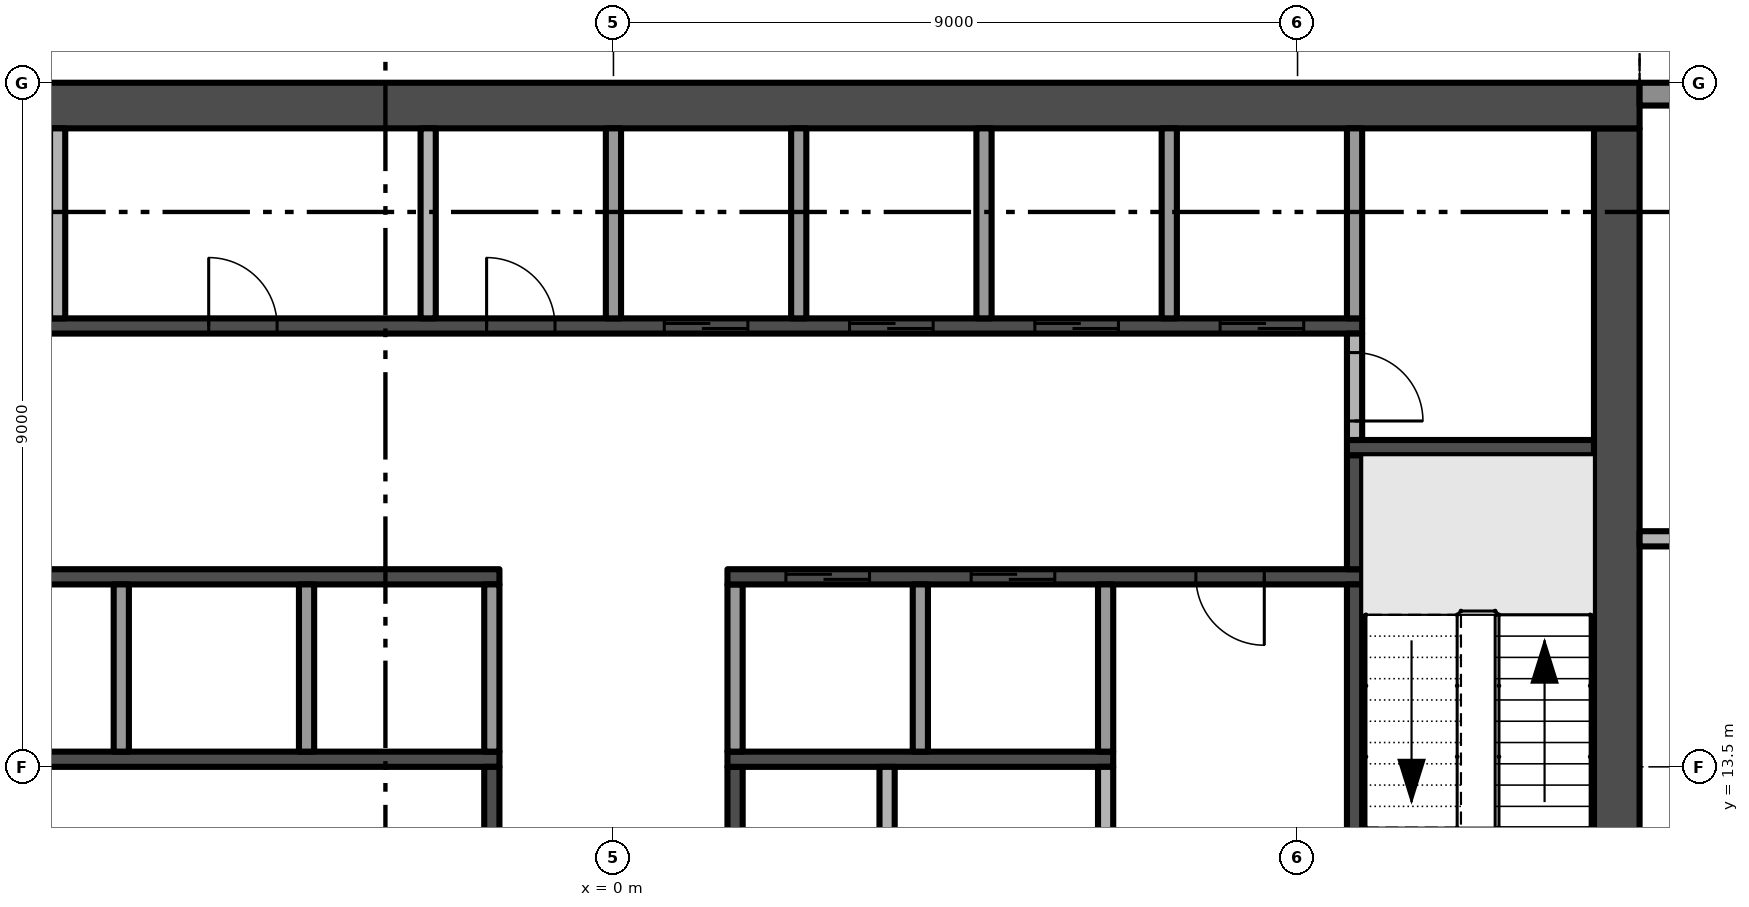
"""IFC4 building model, lengths in metres.
Left out: names, types, materials, properties, quantities, classifications, styles, units other than length and angle.
Written with IfcOpenShell. Run it as: python <this file> out.ifc"""

import sys

from ifc_helpers import new_model, si_unit, direction, frame, frame_2d, origin, place, context, subcontext, project, spatial, rectangle, extrude, element, fill, save


model = new_model("IFC4")
c1 = context("Model", 3, precision=1e-05, world=origin(), true_north=direction((0.0, 1.0)))
c2 = subcontext(c1, "Body", "Model", "MODEL_VIEW")
j1 = project(units=[si_unit("LENGTHUNIT", "METRE"), si_unit("PLANEANGLEUNIT", "RADIAN")], contexts=[c1])
p1 = place(None, origin())
s1 = spatial("IfcSite", under=j1, at=p1, CompositionType="ELEMENT")
p2 = place(p1, origin())
s2 = spatial("IfcBuilding", under=s1, at=p2, CompositionType="ELEMENT")
p3 = place(p2, frame((0.0, 0.0, 269.2)))
s3 = spatial("IfcBuildingStorey", under=s2, at=p3, CompositionType="ELEMENT", Elevation=269.2)
p4 = place(p3, frame((13.2, 5.1, -0.3), z_axis=(0.0, 0.0, 1.0), x_axis=(0.0, 1.0, 0.0)))
e1 = element("IfcWall", 1, at=p4, inside=s3, PredefinedType="SHEAR", context=c2, shape_type="SweptSolid", body=[
    extrude(rectangle(XDim=16.8, YDim=0.6, at=frame_2d((8.4, 0.0))), origin(), (0.0, 0.0, 1.0), 3.8),
])
p5 = place(p4, frame((6.3, 0.0, 0.3)))
e2 = element("IfcOpeningElement", 2, at=p5, cuts=e1, PredefinedType="OPENING", context=c2, shape_type="SweptSolid", body=[
    extrude(rectangle(XDim=1.2, YDim=2.2, at=frame_2d((0.6, 1.1))), frame((0.0, 0.31, 0.0), z_axis=(0.0, -1.0, 0.0), x_axis=(1.0, 0.0, 0.0)), (0.0, 0.0, 1.0), 0.62),
])
p6 = place(p3, frame((13.5, 22.2, -0.3), z_axis=(0.0, 0.0, 1.0), x_axis=(-1.0, 0.0, 0.0)))
e3 = element("IfcWall", 3, at=p6, inside=s3, PredefinedType="SHEAR", context=c2, shape_type="SweptSolid", body=[
    extrude(rectangle(XDim=27.0, YDim=0.6, at=frame_2d((13.5, 0.0))), origin(), (0.0, 0.0, 1.0), 3.8),
])
p7 = place(p3, frame((13.5, 22.35, 0.0), z_axis=(0.0, 0.0, 1.0), x_axis=(1.0, 0.0, 0.0)))
e4 = element("IfcWall", 4, at=p7, inside=s3, PredefinedType="SOLIDWALL", context=c2, shape_type="SweptSolid", body=[
    extrude(rectangle(XDim=4.05, YDim=0.3, at=frame_2d((2.025, 0.0))), origin(), (0.0, 0.0, 1.0), 3.5),
])
p8 = place(p7, frame((0.55, 0.0, 0.0)))
e5 = element("IfcOpeningElement", 5, at=p8, cuts=e4, PredefinedType="OPENING", context=c2, shape_type="SweptSolid", body=[
    extrude(rectangle(XDim=3.2, YDim=2.4, at=frame_2d((1.6, 1.2))), frame((0.0, 0.16, 0.0), z_axis=(0.0, -1.0, 0.0), x_axis=(1.0, 0.0, 0.0)), (0.0, 0.0, 1.0), 0.32),
])
p9 = place(p3, frame((-9.85, 13.6, 0.0), z_axis=(0.0, 0.0, 1.0), x_axis=(1.0, 0.0, 0.0)))
e6 = element("IfcWall", 6, at=p9, inside=s3, PredefinedType="SHEAR", context=c2, shape_type="SweptSolid", body=[
    extrude(rectangle(XDim=8.35, YDim=0.2, at=frame_2d((4.175, 0.0))), origin(), (0.0, 0.0, 1.0), 3.5),
])
p10 = place(p3, frame((-1.5, 16.0, 0.0), z_axis=(0.0, 0.0, 1.0), x_axis=(-1.0, 0.0, 0.0)))
e7 = element("IfcWall", 7, at=p10, inside=s3, PredefinedType="SHEAR", context=c2, shape_type="SweptSolid", body=[
    extrude(rectangle(XDim=8.35, YDim=0.2, at=frame_2d((4.175, 0.0))), origin(), (0.0, 0.0, 1.0), 3.5),
])
p11 = place(p10, frame((6.162, 0.0, 0.0)))
e8 = element("IfcOpeningElement", 8, at=p11, cuts=e7, PredefinedType="OPENING", context=c2, shape_type="SweptSolid", body=[
    extrude(rectangle(XDim=0.9, YDim=2.1, at=frame_2d((0.45, 1.05))), frame((0.0, 0.11, 0.0), z_axis=(0.0, -1.0, 0.0), x_axis=(1.0, 0.0, 0.0)), (0.0, 0.0, 1.0), 0.22),
])
p12 = place(p3, frame((-9.85, 19.3, 0.0), z_axis=(0.0, 0.0, 1.0), x_axis=(1.0, 0.0, 0.0)))
e9 = element("IfcWall", 9, at=p12, inside=s3, PredefinedType="SHEAR", context=c2, shape_type="SweptSolid", body=[
    extrude(rectangle(XDim=19.7, YDim=0.2, at=frame_2d((9.85, 0.0))), origin(), (0.0, 0.0, 1.0), 3.5),
])
p13 = place(p12, frame((10.519, 0.0, 0.0)))
e10 = element("IfcOpeningElement", 10, at=p13, cuts=e9, PredefinedType="OPENING", context=c2, shape_type="SweptSolid", body=[
    extrude(rectangle(XDim=1.1, YDim=2.1, at=frame_2d((0.55, 1.05))), frame((0.0, 0.11, 0.0), z_axis=(0.0, -1.0, 0.0), x_axis=(1.0, 0.0, 0.0)), (0.0, 0.0, 1.0), 0.22),
])
p14 = place(p12, frame((12.956, 0.0, 0.0)))
e11 = element("IfcOpeningElement", 11, at=p14, cuts=e9, PredefinedType="OPENING", context=c2, shape_type="SweptSolid", body=[
    extrude(rectangle(XDim=1.1, YDim=2.1, at=frame_2d((0.55, 1.05))), frame((0.0, 0.11, 0.0), z_axis=(0.0, -1.0, 0.0), x_axis=(1.0, 0.0, 0.0)), (0.0, 0.0, 1.0), 0.22),
])
p15 = place(p12, frame((15.394, 0.0, 0.0)))
e12 = element("IfcOpeningElement", 12, at=p15, cuts=e9, PredefinedType="OPENING", context=c2, shape_type="SweptSolid", body=[
    extrude(rectangle(XDim=1.1, YDim=2.1, at=frame_2d((0.55, 1.05))), frame((0.0, 0.11, 0.0), z_axis=(0.0, -1.0, 0.0), x_axis=(1.0, 0.0, 0.0)), (0.0, 0.0, 1.0), 0.22),
])
p16 = place(p12, frame((17.831, 0.0, 0.0)))
e13 = element("IfcOpeningElement", 13, at=p16, cuts=e9, PredefinedType="OPENING", context=c2, shape_type="SweptSolid", body=[
    extrude(rectangle(XDim=1.1, YDim=2.1, at=frame_2d((0.55, 1.05))), frame((0.0, 0.11, 0.0), z_axis=(0.0, -1.0, 0.0), x_axis=(1.0, 0.0, 0.0)), (0.0, 0.0, 1.0), 0.22),
])
p17 = place(p12, frame((0.869, 0.0, 0.0)))
e14 = element("IfcOpeningElement", 14, at=p17, cuts=e9, PredefinedType="OPENING", context=c2, shape_type="SweptSolid", body=[
    extrude(rectangle(XDim=0.9, YDim=2.1, at=frame_2d((0.45, 1.05))), frame((0.0, 0.11, 0.0), z_axis=(0.0, -1.0, 0.0), x_axis=(1.0, 0.0, 0.0)), (0.0, 0.0, 1.0), 0.22),
])
p18 = place(p12, frame((4.525, 0.0, 0.0)))
e15 = element("IfcOpeningElement", 15, at=p18, cuts=e9, PredefinedType="OPENING", context=c2, shape_type="SweptSolid", body=[
    extrude(rectangle(XDim=0.9, YDim=2.1, at=frame_2d((0.45, 1.05))), frame((0.0, 0.11, 0.0), z_axis=(0.0, -1.0, 0.0), x_axis=(1.0, 0.0, 0.0)), (0.0, 0.0, 1.0), 0.22),
])
p19 = place(p12, frame((8.181, 0.0, 0.0)))
e16 = element("IfcOpeningElement", 16, at=p19, cuts=e9, PredefinedType="OPENING", context=c2, shape_type="SweptSolid", body=[
    extrude(rectangle(XDim=0.9, YDim=2.1, at=frame_2d((0.45, 1.05))), frame((0.0, 0.11, 0.0), z_axis=(0.0, -1.0, 0.0), x_axis=(1.0, 0.0, 0.0)), (0.0, 0.0, 1.0), 0.22),
])
p20 = place(p3, frame((-7.312, 19.4, 0.0), z_axis=(0.0, 0.0, 1.0), x_axis=(0.0, 1.0, 0.0)))
e17 = element("IfcWall", 17, at=p20, inside=s3, PredefinedType="PARTITIONING", context=c2, shape_type="SweptSolid", body=[
    extrude(rectangle(XDim=2.5, YDim=0.2, at=frame_2d((1.25, 0.0))), origin(), (0.0, 0.0, 1.0), 3.5),
])
for number, where, z_axis, x_axis in (
    (18, (-6.475, 13.7, 0.0), (0.0, 0.0, 1.0), (0.0, 1.0, 0.0)),
    (19, (-4.037, 13.7, 0.0), (0.0, 0.0, 1.0), (0.0, 1.0, 0.0)),
):
    element("IfcWall", number, at=place(p3, frame(where, z_axis=z_axis, x_axis=x_axis)), inside=s3, PredefinedType="PARTITIONING", context=c2, shape_type="SweptSolid", body=[
        extrude(rectangle(XDim=2.2, YDim=0.2, at=frame_2d((1.1, 0.0))), origin(), (0.0, 0.0, 1.0), 3.5),
    ])
p21 = place(p3, frame((-2.438, 19.4, 0.0), z_axis=(0.0, 0.0, 1.0), x_axis=(0.0, 1.0, 0.0)))
e20 = element("IfcWall", 20, at=p21, inside=s3, PredefinedType="PARTITIONING", context=c2, shape_type="SweptSolid", body=[
    extrude(rectangle(XDim=2.5, YDim=0.2, at=frame_2d((1.25, 0.0))), origin(), (0.0, 0.0, 1.0), 3.5),
])
p22 = place(p3, frame((-1.6, 8.15, 0.0), z_axis=(0.0, 0.0, 1.0), x_axis=(0.0, 1.0, 0.0)))
e21 = element("IfcWall", 21, at=p22, inside=s3, PredefinedType="SHEAR", context=c2, shape_type="SweptSolid", body=[
    extrude(rectangle(XDim=5.35, YDim=0.2, at=frame_2d((2.675, 0.0))), origin(), (0.0, 0.0, 1.0), 3.5),
])
p23 = place(p22, frame((2.225, 0.0, 0.0)))
e22 = element("IfcOpeningElement", 22, at=p23, cuts=e21, PredefinedType="OPENING", context=c2, shape_type="SweptSolid", body=[
    extrude(rectangle(XDim=0.9, YDim=2.1, at=frame_2d((0.45, 1.05))), frame((0.0, 0.11, 0.0), z_axis=(0.0, -1.0, 0.0), x_axis=(1.0, 0.0, 0.0)), (0.0, 0.0, 1.0), 0.22),
])
p24 = place(p3, frame((-1.6, 13.7, 0.0), z_axis=(0.0, 0.0, 1.0), x_axis=(0.0, 1.0, 0.0)))
e23 = element("IfcWall", 23, at=p24, inside=s3, PredefinedType="PARTITIONING", context=c2, shape_type="SweptSolid", body=[
    extrude(rectangle(XDim=2.2, YDim=0.2, at=frame_2d((1.1, 0.0))), origin(), (0.0, 0.0, 1.0), 3.5),
])
p25 = place(p3, frame((0.0, 19.4, 0.0), z_axis=(0.0, 0.0, 1.0), x_axis=(0.0, 1.0, 0.0)))
e24 = element("IfcWall", 24, at=p25, inside=s3, PredefinedType="PARTITIONING", context=c2, shape_type="SweptSolid", body=[
    extrude(rectangle(XDim=2.5, YDim=0.2, at=frame_2d((1.25, 0.0))), origin(), (0.0, 0.0, 1.0), 3.5),
])
p26 = place(p3, frame((1.6, 13.5, 0.0), z_axis=(0.0, 0.0, 1.0), x_axis=(0.0, -1.0, 0.0)))
e25 = element("IfcWall", 25, at=p26, inside=s3, PredefinedType="SHEAR", context=c2, shape_type="SweptSolid", body=[
    extrude(rectangle(XDim=8.4, YDim=0.2, at=frame_2d((4.2, 0.0))), origin(), (0.0, 0.0, 1.0), 3.5),
])
p27 = place(p26, frame((3.35, 0.0, 0.0)))
e26 = element("IfcOpeningElement", 26, at=p27, cuts=e25, PredefinedType="OPENING", context=c2, shape_type="SweptSolid", body=[
    extrude(rectangle(XDim=0.9, YDim=2.1, at=frame_2d((0.45, 1.05))), frame((0.0, 0.11, 0.0), z_axis=(0.0, -1.0, 0.0), x_axis=(1.0, 0.0, 0.0)), (0.0, 0.0, 1.0), 0.22),
])
p28 = place(p3, frame((1.5, 13.6, 0.0), z_axis=(0.0, 0.0, 1.0), x_axis=(1.0, 0.0, 0.0)))
e27 = element("IfcWall", 27, at=p28, inside=s3, PredefinedType="SHEAR", context=c2, shape_type="SweptSolid", body=[
    extrude(rectangle(XDim=5.075, YDim=0.2, at=frame_2d((2.538, 0.0))), origin(), (0.0, 0.0, 1.0), 3.5),
])
p29 = place(p3, frame((1.6, 13.7, 0.0), z_axis=(0.0, 0.0, 1.0), x_axis=(0.0, 1.0, 0.0)))
e28 = element("IfcWall", 28, at=p29, inside=s3, PredefinedType="PARTITIONING", context=c2, shape_type="SweptSolid", body=[
    extrude(rectangle(XDim=2.2, YDim=0.2, at=frame_2d((1.1, 0.0))), origin(), (0.0, 0.0, 1.0), 3.5),
])
p30 = place(p3, frame((9.85, 16.0, 0.0), z_axis=(0.0, 0.0, 1.0), x_axis=(-1.0, 0.0, 0.0)))
e29 = element("IfcWall", 29, at=p30, inside=s3, PredefinedType="SHEAR", context=c2, shape_type="SweptSolid", body=[
    extrude(rectangle(XDim=8.35, YDim=0.2, at=frame_2d((4.175, 0.0))), origin(), (0.0, 0.0, 1.0), 3.5),
])
p31 = place(p30, frame((6.481, 0.0, 0.0)))
e30 = element("IfcOpeningElement", 30, at=p31, cuts=e29, PredefinedType="OPENING", context=c2, shape_type="SweptSolid", body=[
    extrude(rectangle(XDim=1.1, YDim=2.1, at=frame_2d((0.55, 1.05))), frame((0.0, 0.11, 0.0), z_axis=(0.0, -1.0, 0.0), x_axis=(1.0, 0.0, 0.0)), (0.0, 0.0, 1.0), 0.22),
])
p32 = place(p30, frame((4.044, 0.0, 0.0)))
e31 = element("IfcOpeningElement", 31, at=p32, cuts=e29, PredefinedType="OPENING", context=c2, shape_type="SweptSolid", body=[
    extrude(rectangle(XDim=1.1, YDim=2.1, at=frame_2d((0.55, 1.05))), frame((0.0, 0.11, 0.0), z_axis=(0.0, -1.0, 0.0), x_axis=(1.0, 0.0, 0.0)), (0.0, 0.0, 1.0), 0.22),
])
p33 = place(p30, frame((1.288, 0.0, 0.0)))
e32 = element("IfcOpeningElement", 32, at=p33, cuts=e29, PredefinedType="OPENING", context=c2, shape_type="SweptSolid", body=[
    extrude(rectangle(XDim=0.9, YDim=2.1, at=frame_2d((0.45, 1.05))), frame((0.0, 0.11, 0.0), z_axis=(0.0, -1.0, 0.0), x_axis=(1.0, 0.0, 0.0)), (0.0, 0.0, 1.0), 0.22),
])
p34 = place(p3, frame((2.438, 19.4, 0.0), z_axis=(0.0, 0.0, 1.0), x_axis=(0.0, 1.0, 0.0)))
e33 = element("IfcWall", 33, at=p34, inside=s3, PredefinedType="PARTITIONING", context=c2, shape_type="SweptSolid", body=[
    extrude(rectangle(XDim=2.5, YDim=0.2, at=frame_2d((1.25, 0.0))), origin(), (0.0, 0.0, 1.0), 3.5),
])
p35 = place(p3, frame((3.6, 13.5, 0.0), z_axis=(0.0, 0.0, 1.0), x_axis=(0.0, -1.0, 0.0)))
e34 = element("IfcWall", 34, at=p35, inside=s3, PredefinedType="PARTITIONING", context=c2, shape_type="SweptSolid", body=[
    extrude(rectangle(XDim=8.4, YDim=0.2, at=frame_2d((4.2, 0.0))), origin(), (0.0, 0.0, 1.0), 3.5),
])
p36 = place(p35, frame((3.75, 0.0, 0.0)))
e35 = element("IfcOpeningElement", 35, at=p36, cuts=e34, PredefinedType="OPENING", context=c2, shape_type="SweptSolid", body=[
    extrude(rectangle(XDim=0.9, YDim=2.1, at=frame_2d((0.45, 1.05))), frame((0.0, 0.11, 0.0), z_axis=(0.0, -1.0, 0.0), x_axis=(1.0, 0.0, 0.0)), (0.0, 0.0, 1.0), 0.22),
])
p37 = place(p3, frame((4.037, 13.7, 0.0), z_axis=(0.0, 0.0, 1.0), x_axis=(0.0, 1.0, 0.0)))
e36 = element("IfcWall", 36, at=p37, inside=s3, PredefinedType="PARTITIONING", context=c2, shape_type="SweptSolid", body=[
    extrude(rectangle(XDim=2.2, YDim=0.2, at=frame_2d((1.1, 0.0))), origin(), (0.0, 0.0, 1.0), 3.5),
])
p38 = place(p3, frame((4.875, 19.4, 0.0), z_axis=(0.0, 0.0, 1.0), x_axis=(0.0, 1.0, 0.0)))
e37 = element("IfcWall", 37, at=p38, inside=s3, PredefinedType="PARTITIONING", context=c2, shape_type="SweptSolid", body=[
    extrude(rectangle(XDim=2.5, YDim=0.2, at=frame_2d((1.25, 0.0))), origin(), (0.0, 0.0, 1.0), 3.5),
])
p39 = place(p3, frame((6.475, 12.3, 0.0), z_axis=(0.0, 0.0, 1.0), x_axis=(0.0, 1.0, 0.0)))
e38 = element("IfcWall", 38, at=p39, inside=s3, PredefinedType="PARTITIONING", context=c2, shape_type="SweptSolid", body=[
    extrude(rectangle(XDim=1.2, YDim=0.2, at=frame_2d((0.6, 0.0))), origin(), (0.0, 0.0, 1.0), 3.5),
])
p40 = place(p3, frame((6.475, 13.7, 0.0), z_axis=(0.0, 0.0, 1.0), x_axis=(0.0, 1.0, 0.0)))
e39 = element("IfcWall", 39, at=p40, inside=s3, PredefinedType="PARTITIONING", context=c2, shape_type="SweptSolid", body=[
    extrude(rectangle(XDim=2.2, YDim=0.2, at=frame_2d((1.1, 0.0))), origin(), (0.0, 0.0, 1.0), 3.5),
])
p41 = place(p3, frame((7.312, 19.4, 0.0), z_axis=(0.0, 0.0, 1.0), x_axis=(0.0, 1.0, 0.0)))
e40 = element("IfcWall", 40, at=p41, inside=s3, PredefinedType="PARTITIONING", context=c2, shape_type="SweptSolid", body=[
    extrude(rectangle(XDim=2.5, YDim=0.2, at=frame_2d((1.25, 0.0))), origin(), (0.0, 0.0, 1.0), 3.5),
])
p42 = place(p3, frame((9.75, 12.3, 0.0), z_axis=(0.0, 0.0, 1.0), x_axis=(0.0, 1.0, 0.0)))
e41 = element("IfcWall", 41, at=p42, inside=s3, PredefinedType="SHEAR", context=c2, shape_type="SweptSolid", body=[
    extrude(rectangle(XDim=3.6, YDim=0.2, at=frame_2d((1.8, 0.0))), origin(), (0.0, 0.0, 1.0), 3.5),
])
p43 = place(p3, frame((9.75, 16.1, 0.0), z_axis=(0.0, 0.0, 1.0), x_axis=(0.0, 1.0, 0.0)))
e42 = element("IfcWall", 42, at=p43, inside=s3, PredefinedType="SHEAR", context=c2, shape_type="SweptSolid", body=[
    extrude(rectangle(XDim=1.5, YDim=0.2, at=frame_2d((0.75, 0.0))), origin(), (0.0, 0.0, 1.0), 3.5),
])
p44 = place(p3, frame((9.65, 17.7, 0.0), z_axis=(0.0, 0.0, 1.0), x_axis=(1.0, 0.0, 0.0)))
e43 = element("IfcWall", 43, at=p44, inside=s3, PredefinedType="SHEAR", context=c2, shape_type="SweptSolid", body=[
    extrude(rectangle(XDim=3.25, YDim=0.2, at=frame_2d((1.625, 0.0))), origin(), (0.0, 0.0, 1.0), 3.5),
])
p45 = place(p3, frame((9.75, 19.2, 0.0), z_axis=(0.0, 0.0, 1.0), x_axis=(0.0, -1.0, 0.0)))
e44 = element("IfcWall", 44, at=p45, inside=s3, PredefinedType="PARTITIONING", context=c2, shape_type="SweptSolid", body=[
    extrude(rectangle(XDim=1.4, YDim=0.2, at=frame_2d((0.7, 0.0))), origin(), (0.0, 0.0, 1.0), 3.5),
])
p46 = place(p45, frame((0.25, 0.0, 0.0)))
e45 = element("IfcOpeningElement", 45, at=p46, cuts=e44, PredefinedType="OPENING", context=c2, shape_type="SweptSolid", body=[
    extrude(rectangle(XDim=0.9, YDim=2.1, at=frame_2d((0.45, 1.05))), frame((0.0, 0.11, 0.0), z_axis=(0.0, -1.0, 0.0), x_axis=(1.0, 0.0, 0.0)), (0.0, 0.0, 1.0), 0.22),
])
p47 = place(p3, frame((9.75, 19.4, 0.0), z_axis=(0.0, 0.0, 1.0), x_axis=(0.0, 1.0, 0.0)))
e46 = element("IfcWall", 46, at=p47, inside=s3, PredefinedType="PARTITIONING", context=c2, shape_type="SweptSolid", body=[
    extrude(rectangle(XDim=2.5, YDim=0.2, at=frame_2d((1.25, 0.0))), origin(), (0.0, 0.0, 1.0), 3.5),
])
p48 = place(p3, frame((13.5, 16.5, 0.0), z_axis=(0.0, 0.0, 1.0), x_axis=(1.0, 0.0, 0.0)))
e47 = element("IfcWall", 47, at=p48, inside=s3, PredefinedType="PARTITIONING", context=c2, shape_type="SweptSolid", body=[
    extrude(rectangle(XDim=3.825, YDim=0.2, at=frame_2d((1.913, 0.0))), origin(), (0.0, 0.0, 1.0), 3.5),
])
p49 = place(p48, frame((1.55, 0.0, 0.0)))
e48 = element("IfcOpeningElement", 48, at=p49, cuts=e47, PredefinedType="OPENING", context=c2, shape_type="SweptSolid", body=[
    extrude(rectangle(XDim=0.9, YDim=2.1, at=frame_2d((0.45, 1.05))), frame((0.0, 0.11, 0.0), z_axis=(0.0, -1.0, 0.0), x_axis=(1.0, 0.0, 0.0)), (0.0, 0.0, 1.0), 0.22),
])
p50 = place(p13, origin())
e49 = element("IfcDoor", 49, at=p50, inside=s3, OperationType="SLIDING_TO_RIGHT", PredefinedType="DOOR", context=c2, shape_type="SweptSolid", body=[
    extrude(rectangle(XDim=1.1, YDim=2.1, at=frame_2d((0.55, 1.05))), frame((0.0, 0.025, 0.0), z_axis=(0.0, -1.0, 0.0), x_axis=(1.0, 0.0, 0.0)), (0.0, 0.0, 1.0), 0.05),
])
fill(e10, e49)
p51 = place(p14, origin())
e50 = element("IfcDoor", 50, at=p51, inside=s3, OperationType="SLIDING_TO_RIGHT", PredefinedType="DOOR", context=c2, shape_type="SweptSolid", body=[
    extrude(rectangle(XDim=1.1, YDim=2.1, at=frame_2d((0.55, 1.05))), frame((0.0, 0.025, 0.0), z_axis=(0.0, -1.0, 0.0), x_axis=(1.0, 0.0, 0.0)), (0.0, 0.0, 1.0), 0.05),
])
fill(e11, e50)
p52 = place(p15, origin())
e51 = element("IfcDoor", 51, at=p52, inside=s3, OperationType="SLIDING_TO_RIGHT", PredefinedType="DOOR", context=c2, shape_type="SweptSolid", body=[
    extrude(rectangle(XDim=1.1, YDim=2.1, at=frame_2d((0.55, 1.05))), frame((0.0, 0.025, 0.0), z_axis=(0.0, -1.0, 0.0), x_axis=(1.0, 0.0, 0.0)), (0.0, 0.0, 1.0), 0.05),
])
fill(e12, e51)
p53 = place(p16, origin())
e52 = element("IfcDoor", 52, at=p53, inside=s3, OperationType="SLIDING_TO_RIGHT", PredefinedType="DOOR", context=c2, shape_type="SweptSolid", body=[
    extrude(rectangle(XDim=1.1, YDim=2.1, at=frame_2d((0.55, 1.05))), frame((0.0, 0.025, 0.0), z_axis=(0.0, -1.0, 0.0), x_axis=(1.0, 0.0, 0.0)), (0.0, 0.0, 1.0), 0.05),
])
fill(e13, e52)
p54 = place(p31, origin())
e53 = element("IfcDoor", 53, at=p54, inside=s3, OperationType="SLIDING_TO_RIGHT", PredefinedType="DOOR", context=c2, shape_type="SweptSolid", body=[
    extrude(rectangle(XDim=1.1, YDim=2.1, at=frame_2d((0.55, 1.05))), frame((0.0, 0.025, 0.0), z_axis=(0.0, -1.0, 0.0), x_axis=(1.0, 0.0, 0.0)), (0.0, 0.0, 1.0), 0.05),
])
fill(e30, e53)
p55 = place(p32, origin())
e54 = element("IfcDoor", 54, at=p55, inside=s3, OperationType="SLIDING_TO_RIGHT", PredefinedType="DOOR", context=c2, shape_type="SweptSolid", body=[
    extrude(rectangle(XDim=1.1, YDim=2.1, at=frame_2d((0.55, 1.05))), frame((0.0, 0.025, 0.0), z_axis=(0.0, -1.0, 0.0), x_axis=(1.0, 0.0, 0.0)), (0.0, 0.0, 1.0), 0.05),
])
fill(e31, e54)
p56 = place(p33, origin())
e55 = element("IfcDoor", 55, at=p56, inside=s3, OperationType="SINGLE_SWING_LEFT", PredefinedType="DOOR", context=c2, shape_type="SweptSolid", body=[
    extrude(rectangle(XDim=0.9, YDim=2.1, at=frame_2d((0.45, 1.05))), frame((0.0, 0.025, 0.0), z_axis=(0.0, -1.0, 0.0), x_axis=(1.0, 0.0, 0.0)), (0.0, 0.0, 1.0), 0.05),
])
fill(e32, e55)
p57 = place(p46, origin())
e56 = element("IfcDoor", 56, at=p57, inside=s3, OperationType="SINGLE_SWING_RIGHT", PredefinedType="DOOR", context=c2, shape_type="SweptSolid", body=[
    extrude(rectangle(XDim=0.9, YDim=2.1, at=frame_2d((0.45, 1.05))), frame((0.0, 0.025, 0.0), z_axis=(0.0, -1.0, 0.0), x_axis=(1.0, 0.0, 0.0)), (0.0, 0.0, 1.0), 0.05),
])
fill(e45, e56)
p58 = place(p18, origin())
e57 = element("IfcDoor", 57, at=p58, inside=s3, OperationType="SINGLE_SWING_LEFT", PredefinedType="DOOR", context=c2, shape_type="SweptSolid", body=[
    extrude(rectangle(XDim=0.9, YDim=2.1, at=frame_2d((0.45, 1.05))), frame((0.0, 0.025, 0.0), z_axis=(0.0, -1.0, 0.0), x_axis=(1.0, 0.0, 0.0)), (0.0, 0.0, 1.0), 0.05),
])
fill(e15, e57)
p59 = place(p19, origin())
e58 = element("IfcDoor", 58, at=p59, inside=s3, OperationType="SINGLE_SWING_LEFT", PredefinedType="DOOR", context=c2, shape_type="SweptSolid", body=[
    extrude(rectangle(XDim=0.9, YDim=2.1, at=frame_2d((0.45, 1.05))), frame((0.0, 0.025, 0.0), z_axis=(0.0, -1.0, 0.0), x_axis=(1.0, 0.0, 0.0)), (0.0, 0.0, 1.0), 0.05),
])
fill(e16, e58)
save(model, sys.argv[1])
